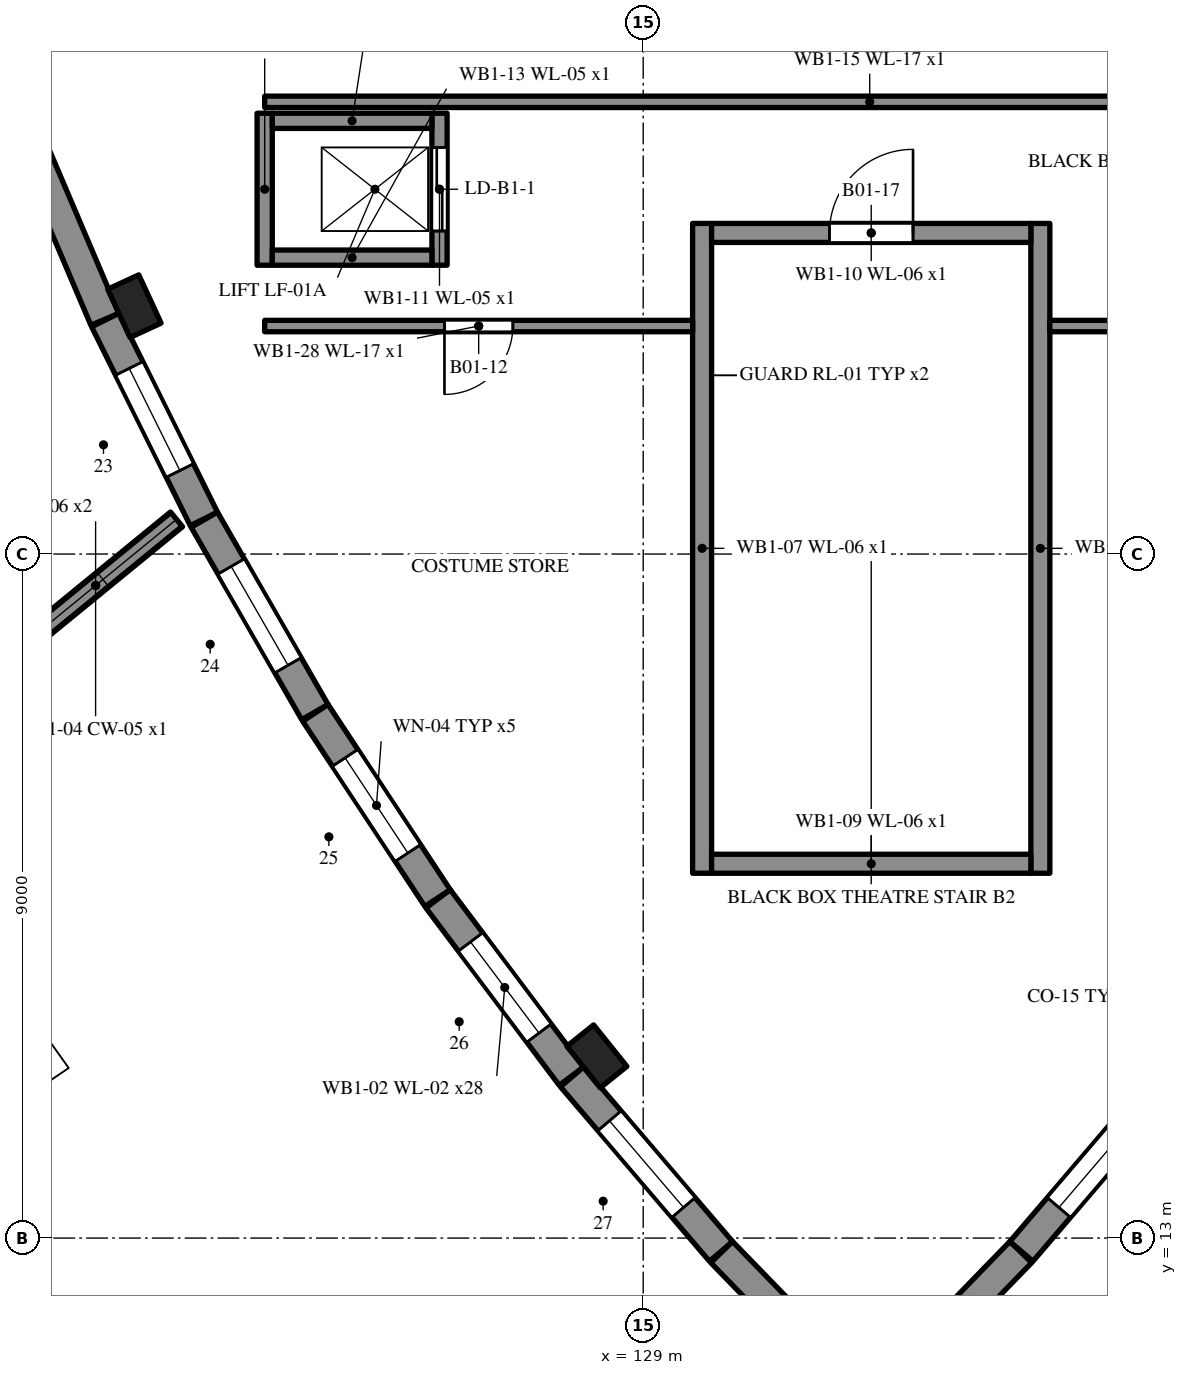
"""IFC4 building model, lengths in metres.
Left out: names, types, materials, properties, quantities, classifications, styles, units other than length and angle.
Written with IfcOpenShell. Run it as: python <this file> out.ifc"""

import sys

from ifc_helpers import new_model, si_unit, direction, frame, frame_2d, origin, origin_2d, place, context, subcontext, project, spatial, polyline, rectangle, outline, extrude, element, fill, save


model = new_model("IFC4")
c1 = context("Model", 3, precision=1e-05, world=origin(), true_north=direction((0.0, 1.0)))
c2 = subcontext(c1, "Body", "Model", "MODEL_VIEW")
j1 = project(units=[si_unit("LENGTHUNIT", "METRE"), si_unit("PLANEANGLEUNIT", "RADIAN")], contexts=[c1])
p1 = place(None, origin())
s1 = spatial("IfcSite", under=j1, at=p1, CompositionType="ELEMENT")
p2 = place(p1, origin())
s2 = spatial("IfcBuilding", under=s1, at=p2, CompositionType="ELEMENT")
p3 = place(p2, frame((0.0, 0.0, 5.4)))
s3 = spatial("IfcBuildingStorey", under=s2, at=p3, CompositionType="ELEMENT", Elevation=5.4)
p4 = place(p3, frame((132.144, 10.935, 0.0), z_axis=(0.0, 0.0, 1.0), x_axis=(0.696353968975, 0.71769850905, 0.0)))
e1 = element("IfcWall", 1, at=p4, inside=s3, PredefinedType="SOLIDWALL", context=c2, shape_type="SweptSolid", body=[
    extrude(rectangle(XDim=2.619, YDim=0.4, at=frame_2d((1.31, 0.0))), origin(), (0.0, 0.0, 1.0), 4.8),
])
p5 = place(p3, frame((133.976, 12.824, 0.0), z_axis=(0.0, 0.0, 1.0), x_axis=(0.649458578854, 0.760396971557, 0.0)))
e2 = element("IfcWall", 2, at=p5, inside=s3, PredefinedType="SOLIDWALL", context=c2, shape_type="SweptSolid", body=[
    extrude(rectangle(XDim=3.019, YDim=0.4, at=frame_2d((1.51, 0.0))), origin(), (0.0, 0.0, 1.0), 4.8),
])
p6 = place(p5, frame((0.76, 0.0, 2.4)))
e3 = element("IfcOpeningElement", 3, at=p6, cuts=e2, PredefinedType="OPENING", context=c2, shape_type="SweptSolid", body=[
    extrude(rectangle(XDim=1.5, YDim=0.9, at=frame_2d((0.75, 0.45))), frame((0.0, 0.21, 0.0), z_axis=(0.0, -1.0, 0.0), x_axis=(1.0, 0.0, 0.0)), (0.0, 0.0, 1.0), 0.42),
])
p7 = place(p3, frame((120.893, 27.496, 0.0), z_axis=(0.0, 0.0, 1.0), x_axis=(0.391529943778, -0.920165367271, 0.0)))
e4 = element("IfcWall", 4, at=p7, inside=s3, PredefinedType="SOLIDWALL", context=c2, shape_type="SweptSolid", body=[
    extrude(rectangle(XDim=2.616, YDim=0.4, at=frame_2d((1.308, 0.0))), origin(), (0.0, 0.0, 1.0), 4.8),
])
p8 = place(p3, frame((121.922, 25.078, 0.0), z_axis=(0.0, 0.0, 1.0), x_axis=(0.44433489597, -0.895860759395, 0.0)))
e5 = element("IfcWall", 5, at=p8, inside=s3, PredefinedType="SOLIDWALL", context=c2, shape_type="SweptSolid", body=[
    extrude(rectangle(XDim=2.92, YDim=0.4, at=frame_2d((1.46, 0.0))), origin(), (0.0, 0.0, 1.0), 4.8),
])
p9 = place(p8, frame((0.71, 0.0, 2.4)))
e6 = element("IfcOpeningElement", 6, at=p9, cuts=e5, PredefinedType="OPENING", context=c2, shape_type="SweptSolid", body=[
    extrude(rectangle(XDim=1.5, YDim=0.9, at=frame_2d((0.75, 0.45))), frame((0.0, 0.21, 0.0), z_axis=(0.0, -1.0, 0.0), x_axis=(1.0, 0.0, 0.0)), (0.0, 0.0, 1.0), 0.42),
])
p10 = place(p3, frame((123.226, 22.452, 0.0), z_axis=(0.0, 0.0, 1.0), x_axis=(0.498406705095, -0.866943340892, 0.0)))
e7 = element("IfcWall", 7, at=p10, inside=s3, PredefinedType="SOLIDWALL", context=c2, shape_type="SweptSolid", body=[
    extrude(rectangle(XDim=2.919, YDim=0.4, at=frame_2d((1.46, 0.0))), origin(), (0.0, 0.0, 1.0), 4.8),
])
p11 = place(p10, frame((0.71, 0.0, 2.4)))
e8 = element("IfcOpeningElement", 8, at=p11, cuts=e7, PredefinedType="OPENING", context=c2, shape_type="SweptSolid", body=[
    extrude(rectangle(XDim=1.5, YDim=0.9, at=frame_2d((0.75, 0.45))), frame((0.0, 0.21, 0.0), z_axis=(0.0, -1.0, 0.0), x_axis=(1.0, 0.0, 0.0)), (0.0, 0.0, 1.0), 0.42),
])
p12 = place(p3, frame((124.687, 19.911, 0.0), z_axis=(0.0, 0.0, 1.0), x_axis=(0.550602185206, -0.834767772285, 0.0)))
e9 = element("IfcWall", 9, at=p12, inside=s3, PredefinedType="SOLIDWALL", context=c2, shape_type="SweptSolid", body=[
    extrude(rectangle(XDim=2.919, YDim=0.4, at=frame_2d((1.46, 0.0))), origin(), (0.0, 0.0, 1.0), 4.8),
])
p13 = place(p12, frame((0.71, 0.0, 2.4)))
e10 = element("IfcOpeningElement", 10, at=p13, cuts=e9, PredefinedType="OPENING", context=c2, shape_type="SweptSolid", body=[
    extrude(rectangle(XDim=1.5, YDim=0.9, at=frame_2d((0.75, 0.45))), frame((0.0, 0.21, 0.0), z_axis=(0.0, -1.0, 0.0), x_axis=(1.0, 0.0, 0.0)), (0.0, 0.0, 1.0), 0.42),
])
p14 = place(p3, frame((126.302, 17.464, 0.0), z_axis=(0.0, 0.0, 1.0), x_axis=(0.600829330321, -0.799377330068, 0.0)))
e11 = element("IfcWall", 11, at=p14, inside=s3, PredefinedType="SOLIDWALL", context=c2, shape_type="SweptSolid", body=[
    extrude(rectangle(XDim=2.919, YDim=0.4, at=frame_2d((1.459, 0.0))), origin(), (0.0, 0.0, 1.0), 4.8),
])
p15 = place(p14, frame((0.71, 0.0, 2.4)))
e12 = element("IfcOpeningElement", 12, at=p15, cuts=e11, PredefinedType="OPENING", context=c2, shape_type="SweptSolid", body=[
    extrude(rectangle(XDim=1.5, YDim=0.9, at=frame_2d((0.75, 0.45))), frame((0.0, 0.21, 0.0), z_axis=(0.0, -1.0, 0.0), x_axis=(1.0, 0.0, 0.0)), (0.0, 0.0, 1.0), 0.42),
])
p16 = place(p3, frame((128.063, 15.12, 0.0), z_axis=(0.0, 0.0, 1.0), x_axis=(0.649458578854, -0.760396971557, 0.0)))
e13 = element("IfcWall", 13, at=p16, inside=s3, PredefinedType="SOLIDWALL", context=c2, shape_type="SweptSolid", body=[
    extrude(rectangle(XDim=3.019, YDim=0.4, at=frame_2d((1.51, 0.0))), origin(), (0.0, 0.0, 1.0), 4.8),
])
p17 = place(p16, frame((0.76, 0.0, 2.4)))
e14 = element("IfcOpeningElement", 14, at=p17, cuts=e13, PredefinedType="OPENING", context=c2, shape_type="SweptSolid", body=[
    extrude(rectangle(XDim=1.5, YDim=0.9, at=frame_2d((0.75, 0.45))), frame((0.0, 0.21, 0.0), z_axis=(0.0, -1.0, 0.0), x_axis=(1.0, 0.0, 0.0)), (0.0, 0.0, 1.0), 0.42),
])
p18 = place(p3, frame((130.032, 12.815, 0.0), z_axis=(0.0, 0.0, 1.0), x_axis=(0.696353968975, -0.71769850905, 0.0)))
e15 = element("IfcWall", 15, at=p18, inside=s3, PredefinedType="SOLIDWALL", context=c2, shape_type="SweptSolid", body=[
    extrude(rectangle(XDim=2.619, YDim=0.4, at=frame_2d((1.31, 0.0))), origin(), (0.0, 0.0, 1.0), 4.8),
])
for number, where, z_axis, x_axis in (
    (16, (128.391, 15.391, 0.0), (0.0, 0.0, 1.0), (0.626, -0.78, 0.0)),
    (17, (122.306, 25.261, 0.0), (0.0, 0.0, 1.0), (0.42, -0.908, 0.0)),
):
    element("IfcColumn", number, at=place(p3, frame(where, z_axis=z_axis, x_axis=x_axis)), inside=s3, PredefinedType="PILASTER", context=c2, shape_type="SweptSolid", body=[
        extrude(rectangle(XDim=0.7, YDim=0.45, at=origin_2d()), origin(), (0.0, 0.0, 1.0), 4.8),
    ])
for number, where, z_axis, x_axis in (
    (18, (129.775, 26.35, 0.0), (0.0, 0.0, 1.0), (0.0, -1.0, 0.0)),
    (19, (134.225, 17.8, 0.0), (0.0, 0.0, 1.0), (0.0, 1.0, 0.0)),
):
    element("IfcWall", number, at=place(p3, frame(where, z_axis=z_axis, x_axis=x_axis)), inside=s3, PredefinedType="SHEAR", context=c2, shape_type="SweptSolid", body=[
        extrude(rectangle(XDim=8.55, YDim=0.25, at=frame_2d((4.275, 0.0))), origin(), (0.0, 0.0, 1.0), 4.5),
    ])
p19 = place(p3, frame((134.1, 17.925, 0.0), z_axis=(0.0, 0.0, 1.0), x_axis=(-1.0, 0.0, 0.0)))
e20 = element("IfcWall", 20, at=p19, inside=s3, PredefinedType="SHEAR", context=c2, shape_type="SweptSolid", body=[
    extrude(rectangle(XDim=4.2, YDim=0.25, at=frame_2d((2.1, 0.0))), origin(), (0.0, 0.0, 1.0), 4.5),
])
p20 = place(p3, frame((129.9, 26.225, 0.0), z_axis=(0.0, 0.0, 1.0), x_axis=(1.0, 0.0, 0.0)))
e21 = element("IfcWall", 21, at=p20, inside=s3, PredefinedType="SHEAR", context=c2, shape_type="SweptSolid", body=[
    extrude(rectangle(XDim=4.2, YDim=0.25, at=frame_2d((2.1, 0.0))), origin(), (0.0, 0.0, 1.0), 4.5),
])
p21 = place(p20, frame((1.55, 0.0, 0.0)))
e22 = element("IfcOpeningElement", 22, at=p21, cuts=e21, PredefinedType="OPENING", context=c2, shape_type="SweptSolid", body=[
    extrude(rectangle(XDim=1.1, YDim=2.1, at=frame_2d((0.55, 1.05))), frame((0.0, 0.135, 0.0), z_axis=(0.0, -1.0, 0.0), x_axis=(1.0, 0.0, 0.0)), (0.0, 0.0, 1.0), 0.27),
])
p22 = place(p3, frame((126.32, 25.8, 0.0), z_axis=(0.0, 0.0, 1.0), x_axis=(0.0, 1.0, 0.0)))
e23 = element("IfcWall", 23, at=p22, inside=s3, PredefinedType="SHEAR", context=c2, shape_type="SweptSolid", body=[
    extrude(rectangle(XDim=2.0, YDim=0.2, at=frame_2d((1.0, 0.0))), origin(), (0.0, 0.0, 1.0), 3.9),
])
p23 = place(p22, frame((0.45, 0.0, 0.0)))
e24 = element("IfcOpeningElement", 24, at=p23, cuts=e23, PredefinedType="OPENING", context=c2, shape_type="SweptSolid", body=[
    extrude(rectangle(XDim=1.1, YDim=2.2, at=frame_2d((0.55, 1.1))), frame((0.0, 0.11, 0.0), z_axis=(0.0, -1.0, 0.0), x_axis=(1.0, 0.0, 0.0)), (0.0, 0.0, 1.0), 0.22),
])
p24 = place(p3, frame((124.02, 27.8, 0.0), z_axis=(0.0, 0.0, 1.0), x_axis=(0.0, -1.0, 0.0)))
e25 = element("IfcWall", 25, at=p24, inside=s3, PredefinedType="SHEAR", context=c2, shape_type="SweptSolid", body=[
    extrude(rectangle(XDim=2.0, YDim=0.2, at=frame_2d((1.0, 0.0))), origin(), (0.0, 0.0, 1.0), 3.9),
])
for number, where, z_axis, x_axis in (
    (26, (124.12, 25.9, 0.0), (0.0, 0.0, 1.0), (1.0, 0.0, 0.0)),
    (27, (126.22, 27.7, 0.0), (0.0, 0.0, 1.0), (-1.0, 0.0, 0.0)),
):
    element("IfcWall", number, at=place(p3, frame(where, z_axis=z_axis, x_axis=x_axis)), inside=s3, PredefinedType="SHEAR", context=c2, shape_type="SweptSolid", body=[
        extrude(rectangle(XDim=2.1, YDim=0.2, at=frame_2d((1.05, 0.0))), origin(), (0.0, 0.0, 1.0), 3.9),
    ])
p25 = place(p3, frame((120.731, 20.715, 3.556), z_axis=(0.0, 0.0, 1.0), x_axis=(0.774147105236, 0.63300573414, 0.0)))
e28 = element("IfcWall", 28, at=p25, inside=s3, PredefinedType="SHEAR", context=c2, shape_type="SweptSolid", body=[
    extrude(outline(polyline([(0.0, 0.0), (2.75, 0.0), (2.75, 0.45), (2.2, 0.484), (1.925, 0.496), (0.0, 0.532), (0.0, 0.0)])), frame((0.0, 0.125, 0.0), z_axis=(0.0, -1.0, 0.0), x_axis=(1.0, 0.0, 0.0)), (0.0, 0.0, 1.0), 0.25),
])
p26 = place(p3, frame((139.94, 27.95, 0.0), z_axis=(0.0, 0.0, 1.0), x_axis=(-1.0, 0.0, 0.0)))
e29 = element("IfcWall", 29, at=p26, inside=s3, PredefinedType="PARTITIONING", context=c2, shape_type="SweptSolid", body=[
    extrude(rectangle(XDim=15.92, YDim=0.15, at=frame_2d((7.96, 0.0))), origin(), (0.0, 0.0, 1.0), 4.5),
])
p27 = place(p3, frame((129.65, 25.0, 0.0), z_axis=(0.0, 0.0, 1.0), x_axis=(-1.0, 0.0, 0.0)))
e30 = element("IfcWall", 30, at=p27, inside=s3, PredefinedType="PARTITIONING", context=c2, shape_type="SweptSolid", body=[
    extrude(rectangle(XDim=5.63, YDim=0.15, at=frame_2d((2.815, 0.0))), origin(), (0.0, 0.0, 1.0), 4.5),
])
p28 = place(p27, frame((2.365, 0.0, 0.0)))
e31 = element("IfcOpeningElement", 31, at=p28, cuts=e30, PredefinedType="OPENING", context=c2, shape_type="SweptSolid", body=[
    extrude(rectangle(XDim=0.9, YDim=2.1, at=frame_2d((0.45, 1.05))), frame((0.0, 0.085, 0.0), z_axis=(0.0, -1.0, 0.0), x_axis=(1.0, 0.0, 0.0)), (0.0, 0.0, 1.0), 0.17),
])
p29 = place(p3, frame((139.98, 25.0, 0.0), z_axis=(0.0, 0.0, 1.0), x_axis=(-1.0, 0.0, 0.0)))
e32 = element("IfcWall", 32, at=p29, inside=s3, PredefinedType="PARTITIONING", context=c2, shape_type="SweptSolid", body=[
    extrude(rectangle(XDim=5.63, YDim=0.15, at=frame_2d((2.815, 0.0))), origin(), (0.0, 0.0, 1.0), 4.5),
])
p30 = place(p29, frame((2.365, 0.0, 0.0)))
e33 = element("IfcOpeningElement", 33, at=p30, cuts=e32, PredefinedType="OPENING", context=c2, shape_type="SweptSolid", body=[
    extrude(rectangle(XDim=0.9, YDim=2.1, at=frame_2d((0.45, 1.05))), frame((0.0, 0.085, 0.0), z_axis=(0.0, -1.0, 0.0), x_axis=(1.0, 0.0, 0.0)), (0.0, 0.0, 1.0), 0.17),
])
p31 = place(p6, origin())
e34 = element("IfcWindow", 34, at=p31, inside=s3, PartitioningType="SINGLE_PANEL", PredefinedType="WINDOW", context=c2, shape_type="SweptSolid", body=[
    extrude(rectangle(XDim=1.5, YDim=0.9, at=frame_2d((0.75, 0.45))), frame((0.0, 0.03, 0.0), z_axis=(0.0, -1.0, 0.0), x_axis=(1.0, 0.0, 0.0)), (0.0, 0.0, 1.0), 0.06),
])
fill(e3, e34)
p32 = place(p9, origin())
e35 = element("IfcWindow", 35, at=p32, inside=s3, PartitioningType="SINGLE_PANEL", PredefinedType="WINDOW", context=c2, shape_type="SweptSolid", body=[
    extrude(rectangle(XDim=1.5, YDim=0.9, at=frame_2d((0.75, 0.45))), frame((0.0, 0.03, 0.0), z_axis=(0.0, -1.0, 0.0), x_axis=(1.0, 0.0, 0.0)), (0.0, 0.0, 1.0), 0.06),
])
fill(e6, e35)
p33 = place(p11, origin())
e36 = element("IfcWindow", 36, at=p33, inside=s3, PartitioningType="SINGLE_PANEL", PredefinedType="WINDOW", context=c2, shape_type="SweptSolid", body=[
    extrude(rectangle(XDim=1.5, YDim=0.9, at=frame_2d((0.75, 0.45))), frame((0.0, 0.03, 0.0), z_axis=(0.0, -1.0, 0.0), x_axis=(1.0, 0.0, 0.0)), (0.0, 0.0, 1.0), 0.06),
])
fill(e8, e36)
p34 = place(p13, origin())
e37 = element("IfcWindow", 37, at=p34, inside=s3, PartitioningType="SINGLE_PANEL", PredefinedType="WINDOW", context=c2, shape_type="SweptSolid", body=[
    extrude(rectangle(XDim=1.5, YDim=0.9, at=frame_2d((0.75, 0.45))), frame((0.0, 0.03, 0.0), z_axis=(0.0, -1.0, 0.0), x_axis=(1.0, 0.0, 0.0)), (0.0, 0.0, 1.0), 0.06),
])
fill(e10, e37)
p35 = place(p15, origin())
e38 = element("IfcWindow", 38, at=p35, inside=s3, PartitioningType="SINGLE_PANEL", PredefinedType="WINDOW", context=c2, shape_type="SweptSolid", body=[
    extrude(rectangle(XDim=1.5, YDim=0.9, at=frame_2d((0.75, 0.45))), frame((0.0, 0.03, 0.0), z_axis=(0.0, -1.0, 0.0), x_axis=(1.0, 0.0, 0.0)), (0.0, 0.0, 1.0), 0.06),
])
fill(e12, e38)
p36 = place(p17, origin())
e39 = element("IfcWindow", 39, at=p36, inside=s3, PartitioningType="SINGLE_PANEL", PredefinedType="WINDOW", context=c2, shape_type="SweptSolid", body=[
    extrude(rectangle(XDim=1.5, YDim=0.9, at=frame_2d((0.75, 0.45))), frame((0.0, 0.03, 0.0), z_axis=(0.0, -1.0, 0.0), x_axis=(1.0, 0.0, 0.0)), (0.0, 0.0, 1.0), 0.06),
])
fill(e14, e39)
p37 = place(p23, origin())
e40 = element("IfcDoor", 40, at=p37, inside=s3, OperationType="SLIDING_TO_LEFT", PredefinedType="DOOR", context=c2, shape_type="SweptSolid", body=[
    extrude(rectangle(XDim=1.1, YDim=2.2, at=frame_2d((0.55, 1.1))), frame((0.0, 0.025, 0.0), z_axis=(0.0, -1.0, 0.0), x_axis=(1.0, 0.0, 0.0)), (0.0, 0.0, 1.0), 0.05),
])
fill(e24, e40)
p38 = place(p28, origin())
e41 = element("IfcDoor", 41, at=p38, inside=s3, OperationType="SINGLE_SWING_RIGHT", PredefinedType="DOOR", context=c2, shape_type="SweptSolid", body=[
    extrude(rectangle(XDim=0.9, YDim=2.1, at=frame_2d((0.45, 1.05))), frame((0.0, 0.025, 0.0), z_axis=(0.0, -1.0, 0.0), x_axis=(1.0, 0.0, 0.0)), (0.0, 0.0, 1.0), 0.05),
])
fill(e31, e41)
p39 = place(p21, origin())
e42 = element("IfcDoor", 42, at=p39, inside=s3, OperationType="SINGLE_SWING_RIGHT", PredefinedType="DOOR", context=c2, shape_type="SweptSolid", body=[
    extrude(rectangle(XDim=1.1, YDim=2.1, at=frame_2d((0.55, 1.05))), frame((0.0, 0.025, 0.0), z_axis=(0.0, -1.0, 0.0), x_axis=(1.0, 0.0, 0.0)), (0.0, 0.0, 1.0), 0.05),
])
fill(e22, e42)
save(model, sys.argv[1])
